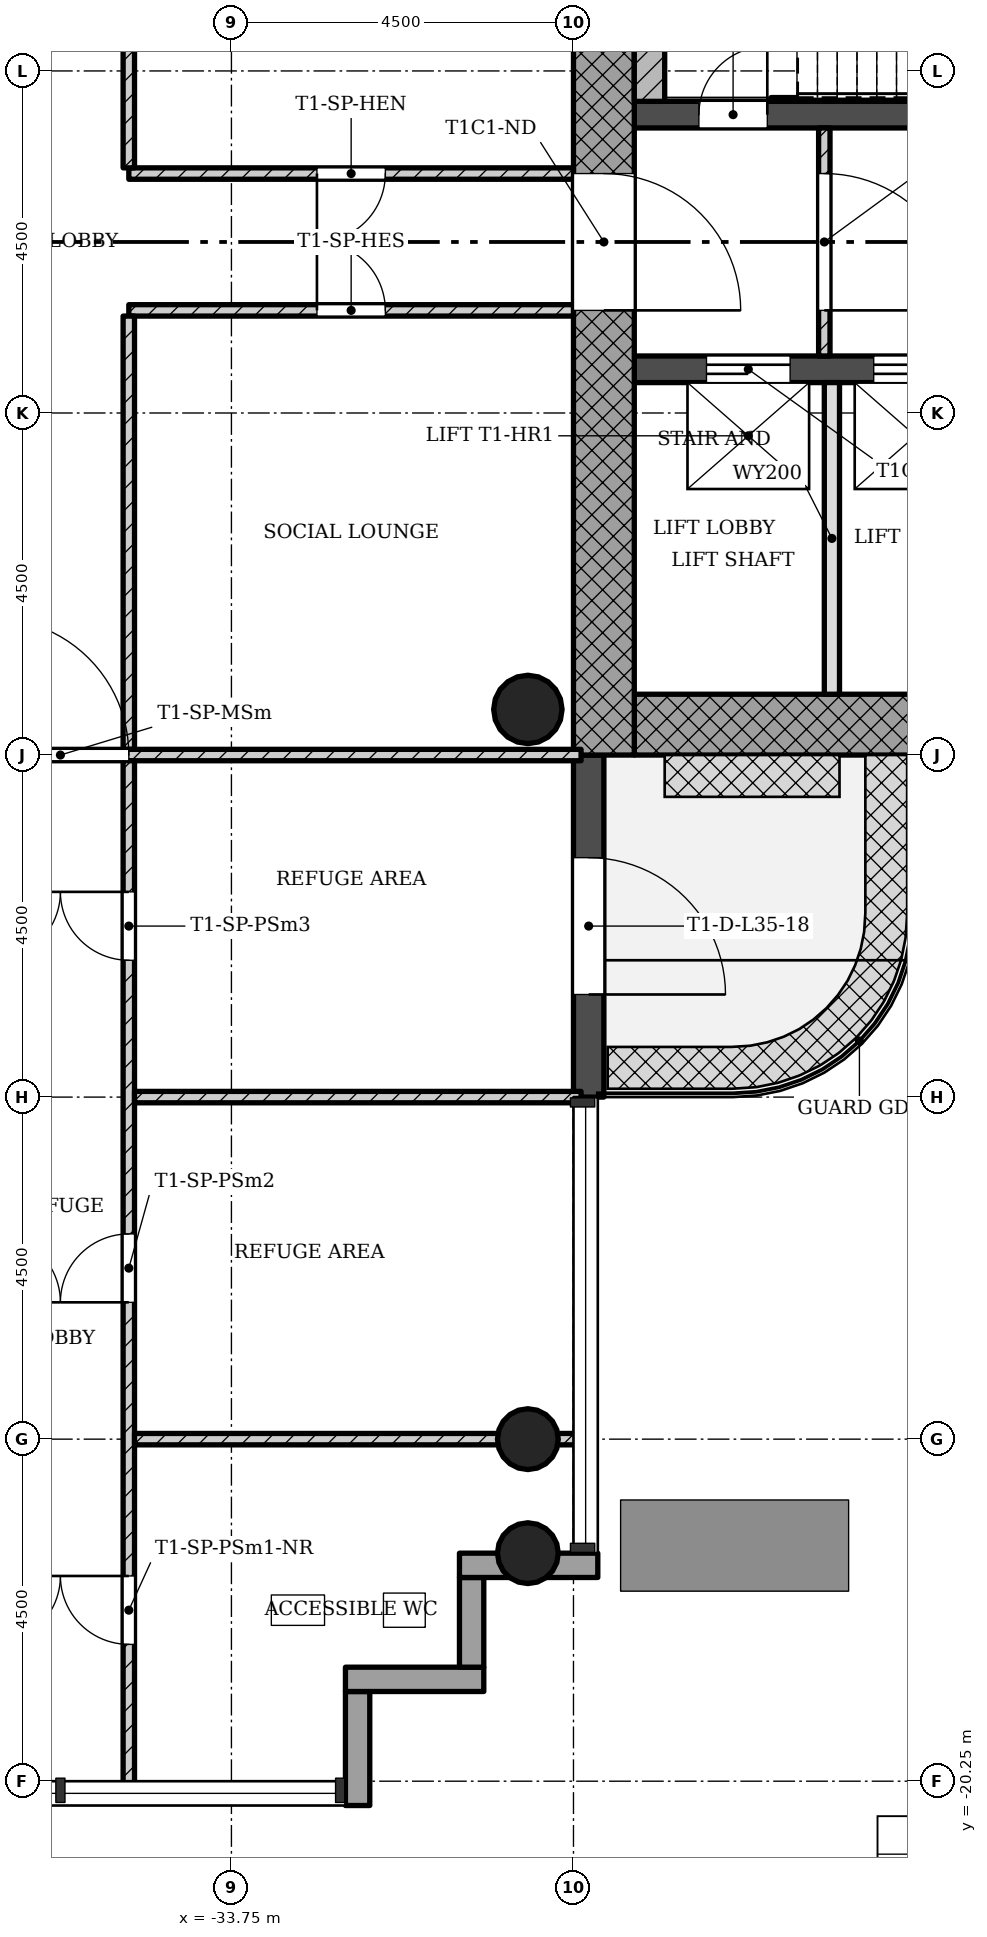
"""IFC4 building model, lengths in metres.
Left out: names, types, materials, properties, quantities, classifications, styles, units other than length and angle.
Written with IfcOpenShell. Run it as: python <this file> out.ifc"""

import sys

from ifc_helpers import new_model, si_unit, direction, frame, frame_2d, origin, origin_2d, place, context, subcontext, project, spatial, rectangle, hollow_circle, extrude, element, fill, save


model = new_model("IFC4")
c1 = context("Model", 3, precision=1e-05, world=origin(), true_north=direction((0.0, 1.0)))
c2 = subcontext(c1, "Body", "Model", "MODEL_VIEW")
j1 = project(units=[si_unit("LENGTHUNIT", "METRE"), si_unit("PLANEANGLEUNIT", "RADIAN")], contexts=[c1])
p1 = place(None, origin())
s1 = spatial("IfcSite", under=j1, at=p1, CompositionType="ELEMENT")
p2 = place(p1, origin())
s2 = spatial("IfcBuilding", under=s1, at=p2, CompositionType="ELEMENT")
p3 = place(p2, frame((0.0, 0.0, 128.7)))
s3 = spatial("IfcBuildingStorey", under=s2, at=p3, CompositionType="ELEMENT", Elevation=128.7)
p4 = place(p3, frame((-28.45, -6.35, 0.0), z_axis=(0.0, 0.0, 1.0), x_axis=(1.0, 0.0, 0.0)))
e1 = element("IfcWall", 1, at=p4, inside=s3, PredefinedType="SHEAR", context=c2, shape_type="SweptSolid", body=[
    extrude(rectangle(XDim=8.2, YDim=0.8, at=frame_2d((4.1, 0.0))), origin(), (0.0, 0.0, 1.0), 5.0),
])
p5 = place(p3, frame((-28.85, 5.95, 0.0), z_axis=(0.0, 0.0, 1.0), x_axis=(0.0, -1.0, 0.0)))
e2 = element("IfcWall", 2, at=p5, inside=s3, PredefinedType="SHEAR", context=c2, shape_type="SweptSolid", body=[
    extrude(rectangle(XDim=12.7, YDim=0.8, at=frame_2d((6.35, 0.0))), origin(), (0.0, 0.0, 1.0), 5.0),
])
p6 = place(p5, frame((5.05, 0.0, 0.0)))
e3 = element("IfcOpeningElement", 3, at=p6, cuts=e2, PredefinedType="OPENING", context=c2, shape_type="SweptSolid", body=[
    extrude(rectangle(XDim=1.8, YDim=2.1, at=frame_2d((0.9, 1.05))), frame((0.0, 0.41, 0.0), z_axis=(0.0, -1.0, 0.0), x_axis=(1.0, 0.0, 0.0)), (0.0, 0.0, 1.0), 0.82),
])
p7 = place(p3, frame((-28.45, -1.675, 0.0), z_axis=(0.0, 0.0, 1.0), x_axis=(1.0, 0.0, 0.0)))
e4 = element("IfcWall", 4, at=p7, inside=s3, PredefinedType="SHEAR", context=c2, shape_type="SweptSolid", body=[
    extrude(rectangle(XDim=7.4, YDim=0.35, at=frame_2d((3.7, 0.0))), origin(), (0.0, 0.0, 1.0), 5.0),
])
p8 = place(p7, frame((0.95, 0.0, 0.0)))
e5 = element("IfcOpeningElement", 5, at=p8, cuts=e4, PredefinedType="OPENING", context=c2, shape_type="SweptSolid", body=[
    extrude(rectangle(XDim=1.1, YDim=2.1, at=frame_2d((0.55, 1.05))), frame((0.0, 0.185, 0.0), z_axis=(0.0, -1.0, 0.0), x_axis=(1.0, 0.0, 0.0)), (0.0, 0.0, 1.0), 0.37),
])
p9 = place(p7, frame((3.15, 0.0, 0.0)))
e6 = element("IfcOpeningElement", 6, at=p9, cuts=e4, PredefinedType="OPENING", context=c2, shape_type="SweptSolid", body=[
    extrude(rectangle(XDim=1.1, YDim=2.1, at=frame_2d((0.55, 1.05))), frame((0.0, 0.185, 0.0), z_axis=(0.0, -1.0, 0.0), x_axis=(1.0, 0.0, 0.0)), (0.0, 0.0, 1.0), 0.37),
])
p10 = place(p7, frame((5.35, 0.0, 0.0)))
e7 = element("IfcOpeningElement", 7, at=p10, cuts=e4, PredefinedType="OPENING", context=c2, shape_type="SweptSolid", body=[
    extrude(rectangle(XDim=1.1, YDim=2.1, at=frame_2d((0.55, 1.05))), frame((0.0, 0.185, 0.0), z_axis=(0.0, -1.0, 0.0), x_axis=(1.0, 0.0, 0.0)), (0.0, 0.0, 1.0), 0.37),
])
p11 = place(p3, frame((-28.45, 1.675, 0.0), z_axis=(0.0, 0.0, 1.0), x_axis=(1.0, 0.0, 0.0)))
e8 = element("IfcWall", 8, at=p11, inside=s3, PredefinedType="SHEAR", context=c2, shape_type="SweptSolid", body=[
    extrude(rectangle(XDim=7.4, YDim=0.35, at=frame_2d((3.7, 0.0))), origin(), (0.0, 0.0, 1.0), 5.0),
])
p12 = place(p11, frame((0.85, 0.0, 0.0)))
e9 = element("IfcOpeningElement", 9, at=p12, cuts=e8, PredefinedType="OPENING", context=c2, shape_type="SweptSolid", body=[
    extrude(rectangle(XDim=0.9, YDim=2.1, at=frame_2d((0.45, 1.05))), frame((0.0, 0.185, 0.0), z_axis=(0.0, -1.0, 0.0), x_axis=(1.0, 0.0, 0.0)), (0.0, 0.0, 1.0), 0.37),
])
for number, where, z_axis, x_axis in (
    (10, (-29.85, -15.75, 0.0), (0.0, 0.0, 1.0), (1.0, 0.0, 0.0)),
    (11, (-29.85, -17.25, 0.0), (0.0, 0.0, 1.0), (1.0, 0.0, 0.0)),
):
    element("IfcColumn", number, at=place(p3, frame(where, z_axis=z_axis, x_axis=x_axis)), inside=s3, PredefinedType="COLUMN", context=c2, shape_type="SweptSolid", body=[
        extrude(hollow_circle(Radius=0.4, WallThickness=0.028, at=origin_2d()), origin(), (0.0, 0.0, 1.0), 5.0),
    ])
p13 = place(p3, frame((-29.85, -6.15, 0.0), z_axis=(0.0, 0.0, 1.0), x_axis=(1.0, 0.0, 0.0)))
e12 = element("IfcColumn", 12, at=p13, inside=s3, PredefinedType="COLUMN", context=c2, shape_type="SweptSolid", body=[
    extrude(hollow_circle(Radius=0.45, WallThickness=0.032, at=origin_2d()), origin(), (0.0, 0.0, 1.0), 5.0),
])
p14 = place(p3, frame((-32.09, -20.57, -0.3), z_axis=(0.0, 0.0, 1.0), x_axis=(0.0, 1.0, 0.0)))
e13 = element("IfcWall", 13, at=p14, inside=s3, PredefinedType="STANDARD", context=c2, shape_type="SweptSolid", body=[
    extrude(rectangle(XDim=1.5, YDim=0.32, at=frame_2d((0.75, 0.0))), origin(), (0.0, 0.0, 1.0), 5.0),
])
p15 = place(p3, frame((-32.25, -18.91, -0.3), z_axis=(0.0, 0.0, 1.0), x_axis=(1.0, 0.0, 0.0)))
e14 = element("IfcWall", 14, at=p15, inside=s3, PredefinedType="STANDARD", context=c2, shape_type="SweptSolid", body=[
    extrude(rectangle(XDim=1.82, YDim=0.32, at=frame_2d((0.91, 0.0))), origin(), (0.0, 0.0, 1.0), 5.0),
])
p16 = place(p3, frame((-30.59, -18.75, -0.3), z_axis=(0.0, 0.0, 1.0), x_axis=(0.0, 1.0, 0.0)))
e15 = element("IfcWall", 15, at=p16, inside=s3, PredefinedType="STANDARD", context=c2, shape_type="SweptSolid", body=[
    extrude(rectangle(XDim=1.18, YDim=0.32, at=frame_2d((0.59, 0.0))), origin(), (0.0, 0.0, 1.0), 5.0),
])
p17 = place(p3, frame((-30.75, -17.41, -0.3), z_axis=(0.0, 0.0, 1.0), x_axis=(1.0, 0.0, 0.0)))
e16 = element("IfcWall", 16, at=p17, inside=s3, PredefinedType="STANDARD", context=c2, shape_type="SweptSolid", body=[
    extrude(rectangle(XDim=1.82, YDim=0.32, at=frame_2d((0.91, 0.0))), origin(), (0.0, 0.0, 1.0), 5.0),
])
p18 = place(p3, frame((-29.05, -11.25, -0.02), z_axis=(0.0, 0.0, 1.0), x_axis=(0.0, 1.0, 0.0)))
e17 = element("IfcWall", 17, at=p18, inside=s3, PredefinedType="STANDARD", context=c2, shape_type="SweptSolid", body=[
    extrude(rectangle(XDim=4.5, YDim=0.4, at=frame_2d((2.25, 0.0))), origin(), (0.0, 0.0, 1.0), 4.72),
])
p19 = place(p18, frame((1.35, 0.0, 0.02)))
e18 = element("IfcOpeningElement", 18, at=p19, cuts=e17, PredefinedType="OPENING", context=c2, shape_type="SweptSolid", body=[
    extrude(rectangle(XDim=1.8, YDim=2.1, at=frame_2d((0.9, 1.05))), frame((0.0, 0.21, 0.0), z_axis=(0.0, -1.0, 0.0), x_axis=(1.0, 0.0, 0.0)), (0.0, 0.0, 1.0), 0.42),
])
p20 = place(p3, frame((-25.95, -1.5, 0.0), z_axis=(0.0, 0.0, 1.0), x_axis=(0.0, 1.0, 0.0)))
e19 = element("IfcWall", 19, at=p20, inside=s3, PredefinedType="PARTITIONING", context=c2, shape_type="SweptSolid", body=[
    extrude(rectangle(XDim=3.0, YDim=0.15, at=frame_2d((1.5, 0.0))), origin(), (0.0, 0.0, 1.0), 4.58),
])
p21 = place(p20, frame((0.6, 0.0, 0.0)))
e20 = element("IfcOpeningElement", 20, at=p21, cuts=e19, PredefinedType="OPENING", context=c2, shape_type="SweptSolid", body=[
    extrude(rectangle(XDim=1.8, YDim=2.1, at=frame_2d((0.9, 1.05))), frame((0.0, 0.085, 0.0), z_axis=(0.0, -1.0, 0.0), x_axis=(1.0, 0.0, 0.0)), (0.0, 0.0, 1.0), 0.17),
])
p22 = place(p3, frame((-25.85, -5.95, 0.0), z_axis=(0.0, 0.0, 1.0), x_axis=(0.0, 1.0, 0.0)))
e21 = element("IfcWall", 21, at=p22, inside=s3, PredefinedType="SOLIDWALL", context=c2, shape_type="SweptSolid", body=[
    extrude(rectangle(XDim=4.1, YDim=0.2, at=frame_2d((2.05, 0.0))), origin(), (0.0, 0.0, 1.0), 4.58),
])
p23 = place(p3, frame((-35.1, 0.9, 0.0), z_axis=(0.0, 0.0, 1.0), x_axis=(1.0, 0.0, 0.0)))
e22 = element("IfcWall", 22, at=p23, inside=s3, PredefinedType="PARTITIONING", context=c2, shape_type="SweptSolid", body=[
    extrude(rectangle(XDim=5.85, YDim=0.15, at=frame_2d((2.925, 0.0))), origin(), (0.0, 0.0, 1.0), 4.58),
])
p24 = place(p23, frame((2.475, 0.0, 0.0)))
e23 = element("IfcOpeningElement", 23, at=p24, cuts=e22, PredefinedType="OPENING", context=c2, shape_type="SweptSolid", body=[
    extrude(rectangle(XDim=0.9, YDim=2.1, at=frame_2d((0.45, 1.05))), frame((0.0, 0.085, 0.0), z_axis=(0.0, -1.0, 0.0), x_axis=(1.0, 0.0, 0.0)), (0.0, 0.0, 1.0), 0.17),
])
p25 = place(p3, frame((-35.1, 0.975, 0.0), z_axis=(0.0, 0.0, 1.0), x_axis=(0.0, 1.0, 0.0)))
e24 = element("IfcWall", 24, at=p25, inside=s3, PredefinedType="PARTITIONING", context=c2, shape_type="SweptSolid", body=[
    extrude(rectangle(XDim=5.7, YDim=0.15, at=frame_2d((2.85, 0.0))), origin(), (0.0, 0.0, 1.0), 4.58),
])
p26 = place(p3, frame((-35.1, -0.9, 0.0), z_axis=(0.0, 0.0, 1.0), x_axis=(1.0, 0.0, 0.0)))
e25 = element("IfcWall", 25, at=p26, inside=s3, PredefinedType="PARTITIONING", context=c2, shape_type="SweptSolid", body=[
    extrude(rectangle(XDim=5.85, YDim=0.15, at=frame_2d((2.925, 0.0))), origin(), (0.0, 0.0, 1.0), 4.58),
])
p27 = place(p26, frame((2.475, 0.0, 0.0)))
e26 = element("IfcOpeningElement", 26, at=p27, cuts=e25, PredefinedType="OPENING", context=c2, shape_type="SweptSolid", body=[
    extrude(rectangle(XDim=0.9, YDim=2.1, at=frame_2d((0.45, 1.05))), frame((0.0, 0.085, 0.0), z_axis=(0.0, -1.0, 0.0), x_axis=(1.0, 0.0, 0.0)), (0.0, 0.0, 1.0), 0.17),
])
p28 = place(p3, frame((-35.1, -6.675, 0.0), z_axis=(0.0, 0.0, 1.0), x_axis=(0.0, 1.0, 0.0)))
e27 = element("IfcWall", 27, at=p28, inside=s3, PredefinedType="PARTITIONING", context=c2, shape_type="SweptSolid", body=[
    extrude(rectangle(XDim=5.7, YDim=0.15, at=frame_2d((2.85, 0.0))), origin(), (0.0, 0.0, 1.0), 4.58),
])
p29 = place(p3, frame((-42.85, -6.75, 0.0), z_axis=(0.0, 0.0, 1.0), x_axis=(1.0, 0.0, 0.0)))
e28 = element("IfcWall", 28, at=p29, inside=s3, PredefinedType="PARTITIONING", context=c2, shape_type="SweptSolid", body=[
    extrude(rectangle(XDim=13.7, YDim=0.15, at=frame_2d((6.85, 0.0))), origin(), (0.0, 0.0, 1.0), 4.58),
])
p30 = place(p29, frame((5.95, 0.0, 0.0)))
e29 = element("IfcOpeningElement", 29, at=p30, cuts=e28, PredefinedType="OPENING", context=c2, shape_type="SweptSolid", body=[
    extrude(rectangle(XDim=1.8, YDim=2.1, at=frame_2d((0.9, 1.05))), frame((0.0, 0.085, 0.0), z_axis=(0.0, -1.0, 0.0), x_axis=(1.0, 0.0, 0.0)), (0.0, 0.0, 1.0), 0.17),
])
p31 = place(p3, frame((-35.1, -20.35, 0.0), z_axis=(0.0, 0.0, 1.0), x_axis=(0.0, 1.0, 0.0)))
e30 = element("IfcWall", 30, at=p31, inside=s3, PredefinedType="PARTITIONING", context=c2, shape_type="SweptSolid", body=[
    extrude(rectangle(XDim=13.525, YDim=0.15, at=frame_2d((6.763, 0.0))), origin(), (0.0, 0.0, 1.0), 4.58),
])
p32 = place(p31, frame((1.9, 0.0, 0.0)))
e31 = element("IfcOpeningElement", 31, at=p32, cuts=e30, PredefinedType="OPENING", context=c2, shape_type="SweptSolid", body=[
    extrude(rectangle(XDim=0.9, YDim=2.1, at=frame_2d((0.45, 1.05))), frame((0.0, 0.085, 0.0), z_axis=(0.0, -1.0, 0.0), x_axis=(1.0, 0.0, 0.0)), (0.0, 0.0, 1.0), 0.17),
])
p33 = place(p31, frame((6.4, 0.0, 0.0)))
e32 = element("IfcOpeningElement", 32, at=p33, cuts=e30, PredefinedType="OPENING", context=c2, shape_type="SweptSolid", body=[
    extrude(rectangle(XDim=0.9, YDim=2.1, at=frame_2d((0.45, 1.05))), frame((0.0, 0.085, 0.0), z_axis=(0.0, -1.0, 0.0), x_axis=(1.0, 0.0, 0.0)), (0.0, 0.0, 1.0), 0.17),
])
p34 = place(p31, frame((10.9, 0.0, 0.0)))
e33 = element("IfcOpeningElement", 33, at=p34, cuts=e30, PredefinedType="OPENING", context=c2, shape_type="SweptSolid", body=[
    extrude(rectangle(XDim=0.9, YDim=2.1, at=frame_2d((0.45, 1.05))), frame((0.0, 0.085, 0.0), z_axis=(0.0, -1.0, 0.0), x_axis=(1.0, 0.0, 0.0)), (0.0, 0.0, 1.0), 0.17),
])
for number, where, z_axis, x_axis in (
    (34, (-35.025, -15.75, 0.0), (0.0, 0.0, 1.0), (1.0, 0.0, 0.0)),
    (35, (-35.025, -11.25, 0.0), (0.0, 0.0, 1.0), (1.0, 0.0, 0.0)),
):
    element("IfcWall", number, at=place(p3, frame(where, z_axis=z_axis, x_axis=x_axis)), inside=s3, PredefinedType="PARTITIONING", context=c2, shape_type="SweptSolid", body=[
        extrude(rectangle(XDim=5.875, YDim=0.15, at=frame_2d((2.938, 0.0))), origin(), (0.0, 0.0, 1.0), 4.58),
    ])
p35 = place(p3, frame((-28.25, 1.85, 0.0), z_axis=(0.0, 0.0, 1.0), x_axis=(0.0, 1.0, 0.0)))
e36 = element("IfcWall", 36, at=p35, inside=s3, PredefinedType="SHEAR", context=c2, shape_type="SweptSolid", body=[
    extrude(rectangle(XDim=4.1, YDim=0.4, at=frame_2d((2.05, 0.0))), origin(), (0.0, 0.0, 1.0), 5.0),
])
p36 = place(p3, frame((-26.65, 1.875, 0.0), z_axis=(0.0, 0.0, 1.0), x_axis=(1.0, 0.0, 0.0)))
e37 = element("IfcWall", 37, at=p36, inside=s3, PredefinedType="SHEAR", context=c2, shape_type="SweptSolid", body=[
    extrude(rectangle(XDim=5.2, YDim=0.05, at=frame_2d((2.6, 0.0))), origin(), (0.0, 0.0, 1.0), 5.0),
])
p37 = place(p19, origin())
e38 = element("IfcDoor", 38, at=p37, inside=s3, OperationType="SINGLE_SWING_LEFT", PredefinedType="DOOR", context=c2, shape_type="SweptSolid", body=[
    extrude(rectangle(XDim=1.8, YDim=2.1, at=frame_2d((0.9, 1.05))), frame((0.0, 0.025, 0.0), z_axis=(0.0, -1.0, 0.0), x_axis=(1.0, 0.0, 0.0)), (0.0, 0.0, 1.0), 0.05),
])
fill(e18, e38)
p38 = place(p21, origin())
e39 = element("IfcDoor", 39, at=p38, inside=s3, OperationType="SINGLE_SWING_LEFT", PredefinedType="DOOR", context=c2, shape_type="SweptSolid", body=[
    extrude(rectangle(XDim=1.8, YDim=2.1, at=frame_2d((0.9, 1.05))), frame((0.0, 0.025, 0.0), z_axis=(0.0, -1.0, 0.0), x_axis=(1.0, 0.0, 0.0)), (0.0, 0.0, 1.0), 0.05),
])
fill(e20, e39)
p39 = place(p24, origin())
e40 = element("IfcDoor", 40, at=p39, inside=s3, OperationType="SINGLE_SWING_LEFT", PredefinedType="DOOR", context=c2, shape_type="SweptSolid", body=[
    extrude(rectangle(XDim=0.9, YDim=2.1, at=frame_2d((0.45, 1.05))), frame((0.0, 0.025, 0.0), z_axis=(0.0, -1.0, 0.0), x_axis=(1.0, 0.0, 0.0)), (0.0, 0.0, 1.0), 0.05),
])
fill(e23, e40)
p40 = place(p27, origin())
e41 = element("IfcDoor", 41, at=p40, inside=s3, OperationType="SINGLE_SWING_RIGHT", PredefinedType="DOOR", context=c2, shape_type="SweptSolid", body=[
    extrude(rectangle(XDim=0.9, YDim=2.1, at=frame_2d((0.45, 1.05))), frame((0.0, 0.025, 0.0), z_axis=(0.0, -1.0, 0.0), x_axis=(1.0, 0.0, 0.0)), (0.0, 0.0, 1.0), 0.05),
])
fill(e26, e41)
p41 = place(p30, origin())
e42 = element("IfcDoor", 42, at=p41, inside=s3, OperationType="SINGLE_SWING_RIGHT", PredefinedType="DOOR", context=c2, shape_type="SweptSolid", body=[
    extrude(rectangle(XDim=1.8, YDim=2.1, at=frame_2d((0.9, 1.05))), frame((0.0, 0.025, 0.0), z_axis=(0.0, -1.0, 0.0), x_axis=(1.0, 0.0, 0.0)), (0.0, 0.0, 1.0), 0.05),
])
fill(e29, e42)
p42 = place(p32, origin())
e43 = element("IfcDoor", 43, at=p42, inside=s3, OperationType="SINGLE_SWING_LEFT", PredefinedType="DOOR", context=c2, shape_type="SweptSolid", body=[
    extrude(rectangle(XDim=0.9, YDim=2.1, at=frame_2d((0.45, 1.05))), frame((0.0, 0.025, 0.0), z_axis=(0.0, -1.0, 0.0), x_axis=(1.0, 0.0, 0.0)), (0.0, 0.0, 1.0), 0.05),
])
fill(e31, e43)
p43 = place(p33, origin())
e44 = element("IfcDoor", 44, at=p43, inside=s3, OperationType="SINGLE_SWING_RIGHT", PredefinedType="DOOR", context=c2, shape_type="SweptSolid", body=[
    extrude(rectangle(XDim=0.9, YDim=2.1, at=frame_2d((0.45, 1.05))), frame((0.0, 0.025, 0.0), z_axis=(0.0, -1.0, 0.0), x_axis=(1.0, 0.0, 0.0)), (0.0, 0.0, 1.0), 0.05),
])
fill(e32, e44)
p44 = place(p34, origin())
e45 = element("IfcDoor", 45, at=p44, inside=s3, OperationType="SINGLE_SWING_LEFT", PredefinedType="DOOR", context=c2, shape_type="SweptSolid", body=[
    extrude(rectangle(XDim=0.9, YDim=2.1, at=frame_2d((0.45, 1.05))), frame((0.0, 0.025, 0.0), z_axis=(0.0, -1.0, 0.0), x_axis=(1.0, 0.0, 0.0)), (0.0, 0.0, 1.0), 0.05),
])
fill(e33, e45)
p45 = place(p12, origin())
e46 = element("IfcDoor", 46, at=p45, inside=s3, OperationType="SINGLE_SWING_LEFT", PredefinedType="DOOR", context=c2, shape_type="SweptSolid", body=[
    extrude(rectangle(XDim=0.9, YDim=2.1, at=frame_2d((0.45, 1.05))), frame((0.0, 0.025, 0.0), z_axis=(0.0, -1.0, 0.0), x_axis=(1.0, 0.0, 0.0)), (0.0, 0.0, 1.0), 0.05),
])
fill(e9, e46)
p46 = place(p8, origin())
e47 = element("IfcDoor", 47, at=p46, inside=s3, OperationType="SLIDING_TO_LEFT", PredefinedType="DOOR", context=c2, shape_type="SweptSolid", body=[
    extrude(rectangle(XDim=1.1, YDim=2.1, at=frame_2d((0.55, 1.05))), frame((0.0, 0.025, 0.0), z_axis=(0.0, -1.0, 0.0), x_axis=(1.0, 0.0, 0.0)), (0.0, 0.0, 1.0), 0.05),
])
fill(e5, e47)
p47 = place(p9, origin())
e48 = element("IfcDoor", 48, at=p47, inside=s3, OperationType="SLIDING_TO_LEFT", PredefinedType="DOOR", context=c2, shape_type="SweptSolid", body=[
    extrude(rectangle(XDim=1.1, YDim=2.1, at=frame_2d((0.55, 1.05))), frame((0.0, 0.025, 0.0), z_axis=(0.0, -1.0, 0.0), x_axis=(1.0, 0.0, 0.0)), (0.0, 0.0, 1.0), 0.05),
])
fill(e6, e48)
p48 = place(p6, origin())
e49 = element("IfcDoor", 49, at=p48, inside=s3, OperationType="SINGLE_SWING_LEFT", PredefinedType="DOOR", context=c2, shape_type="SweptSolid", body=[
    extrude(rectangle(XDim=1.8, YDim=2.1, at=frame_2d((0.9, 1.05))), frame((0.0, 0.025, 0.0), z_axis=(0.0, -1.0, 0.0), x_axis=(1.0, 0.0, 0.0)), (0.0, 0.0, 1.0), 0.05),
])
fill(e3, e49)
save(model, sys.argv[1])
